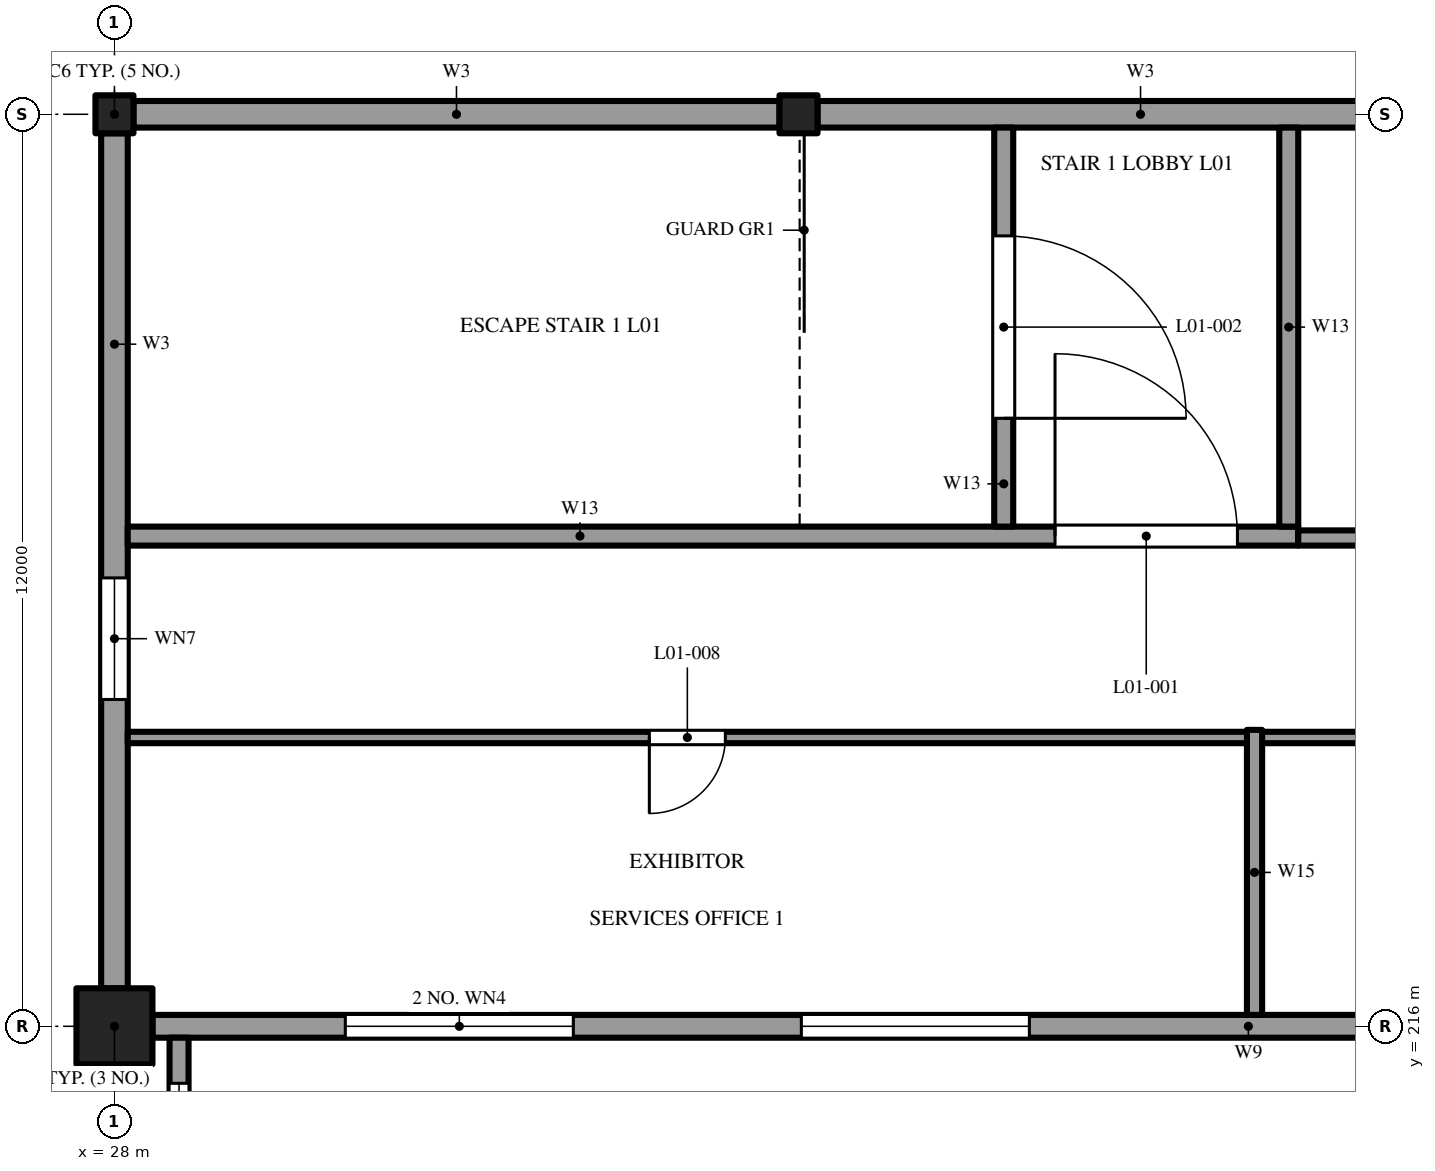
"""IFC4 building model, lengths in metres.
Left out: names, types, materials, properties, quantities, classifications, styles, units other than length and angle.
Written with IfcOpenShell. Run it as: python <this file> out.ifc"""

import sys

from ifc_helpers import new_model, si_unit, direction, frame, frame_2d, origin, origin_2d, place, context, subcontext, project, spatial, polyline, rectangle, outline, extrude, element, fill, save


model = new_model("IFC4")
c1 = context("Model", 3, precision=1e-05, world=origin(), true_north=direction((0.0, 1.0)))
c2 = subcontext(c1, "Body", "Model", "MODEL_VIEW")
j1 = project(units=[si_unit("LENGTHUNIT", "METRE"), si_unit("PLANEANGLEUNIT", "RADIAN")], contexts=[c1])
p1 = place(None, origin())
s1 = spatial("IfcSite", under=j1, at=p1, CompositionType="ELEMENT")
p2 = place(p1, origin())
s2 = spatial("IfcBuilding", under=s1, at=p2, CompositionType="ELEMENT")
p3 = place(p2, frame((0.0, 0.0, 7.2)))
s3 = spatial("IfcBuildingStorey", under=s2, at=p3, CompositionType="ELEMENT", Elevation=7.2)
p4 = place(p3, frame((28.0, 216.0, 0.0), z_axis=(0.0, 0.0, 1.0), x_axis=(1.0, 0.0, 0.0)))
e1 = element("IfcColumn", 1, at=p4, inside=s3, PredefinedType="COLUMN", context=c2, shape_type="SweptSolid", body=[
    extrude(rectangle(XDim=1.0, YDim=1.0, at=origin_2d()), origin(), (0.0, 0.0, 1.0), 4.8),
])
for number, where, z_axis, x_axis in (
    (2, (28.0, 228.0, 0.0), (0.0, 0.0, 1.0), (1.0, 0.0, 0.0)),
    (3, (37.0, 228.0, 0.0), (0.0, 0.0, 1.0), (1.0, 0.0, 0.0)),
):
    element("IfcColumn", number, at=place(p3, frame(where, z_axis=z_axis, x_axis=x_axis)), inside=s3, PredefinedType="COLUMN", context=c2, shape_type="SweptSolid", body=[
        extrude(rectangle(XDim=0.5, YDim=0.5, at=origin_2d()), origin(), (0.0, 0.0, 1.0), 4.121),
    ])
p5 = place(p3, frame((28.5, 216.0, 0.0), z_axis=(0.0, 0.0, 1.0), x_axis=(1.0, 0.0, 0.0)))
e4 = element("IfcWall", 4, at=p5, inside=s3, PredefinedType="SOLIDWALL", context=c2, shape_type="SweptSolid", body=[
    extrude(rectangle(XDim=17.0, YDim=0.3, at=frame_2d((8.5, 0.0))), origin(), (0.0, 0.0, 1.0), 4.8),
])
p6 = place(p5, frame((2.538, 0.0, 1.0)))
e5 = element("IfcOpeningElement", 5, at=p6, cuts=e4, PredefinedType="OPENING", context=c2, shape_type="SweptSolid", body=[
    extrude(rectangle(XDim=3.0, YDim=1.8, at=frame_2d((1.5, 0.9))), frame((0.0, 0.16, 0.0), z_axis=(0.0, -1.0, 0.0), x_axis=(1.0, 0.0, 0.0)), (0.0, 0.0, 1.0), 0.32),
])
p7 = place(p5, frame((8.538, 0.0, 1.0)))
e6 = element("IfcOpeningElement", 6, at=p7, cuts=e4, PredefinedType="OPENING", context=c2, shape_type="SweptSolid", body=[
    extrude(rectangle(XDim=3.0, YDim=1.8, at=frame_2d((1.5, 0.9))), frame((0.0, 0.16, 0.0), z_axis=(0.0, -1.0, 0.0), x_axis=(1.0, 0.0, 0.0)), (0.0, 0.0, 1.0), 0.32),
])
p8 = place(p3, frame((28.85, 132.15, 0.0), z_axis=(0.0, 0.0, 1.0), x_axis=(0.0, 1.0, 0.0)))
e7 = element("IfcWall", 7, at=p8, inside=s3, PredefinedType="SOLIDWALL", context=c2, shape_type="SweptSolid", body=[
    extrude(rectangle(XDim=83.7, YDim=0.25, at=frame_2d((41.85, 0.0))), origin(), (0.0, 0.0, 1.0), 4.8),
])
p9 = place(p8, frame((0.6, 0.0, 0.4)))
e8 = element("IfcOpeningElement", 8, at=p9, cuts=e7, PredefinedType="OPENING", context=c2, shape_type="SweptSolid", body=[
    extrude(rectangle(XDim=4.5, YDim=3.6, at=frame_2d((2.25, 1.8))), frame((0.0, 0.135, 0.0), z_axis=(0.0, -1.0, 0.0), x_axis=(1.0, 0.0, 0.0)), (0.0, 0.0, 1.0), 0.27),
])
p10 = place(p8, frame((6.6, 0.0, 0.4)))
e9 = element("IfcOpeningElement", 9, at=p10, cuts=e7, PredefinedType="OPENING", context=c2, shape_type="SweptSolid", body=[
    extrude(rectangle(XDim=4.5, YDim=3.6, at=frame_2d((2.25, 1.8))), frame((0.0, 0.135, 0.0), z_axis=(0.0, -1.0, 0.0), x_axis=(1.0, 0.0, 0.0)), (0.0, 0.0, 1.0), 0.27),
])
p11 = place(p8, frame((12.6, 0.0, 0.4)))
e10 = element("IfcOpeningElement", 10, at=p11, cuts=e7, PredefinedType="OPENING", context=c2, shape_type="SweptSolid", body=[
    extrude(rectangle(XDim=4.5, YDim=3.6, at=frame_2d((2.25, 1.8))), frame((0.0, 0.135, 0.0), z_axis=(0.0, -1.0, 0.0), x_axis=(1.0, 0.0, 0.0)), (0.0, 0.0, 1.0), 0.27),
])
p12 = place(p8, frame((18.6, 0.0, 0.4)))
e11 = element("IfcOpeningElement", 11, at=p12, cuts=e7, PredefinedType="OPENING", context=c2, shape_type="SweptSolid", body=[
    extrude(rectangle(XDim=4.5, YDim=3.6, at=frame_2d((2.25, 1.8))), frame((0.0, 0.135, 0.0), z_axis=(0.0, -1.0, 0.0), x_axis=(1.0, 0.0, 0.0)), (0.0, 0.0, 1.0), 0.27),
])
p13 = place(p8, frame((24.6, 0.0, 0.4)))
e12 = element("IfcOpeningElement", 12, at=p13, cuts=e7, PredefinedType="OPENING", context=c2, shape_type="SweptSolid", body=[
    extrude(rectangle(XDim=4.5, YDim=3.6, at=frame_2d((2.25, 1.8))), frame((0.0, 0.135, 0.0), z_axis=(0.0, -1.0, 0.0), x_axis=(1.0, 0.0, 0.0)), (0.0, 0.0, 1.0), 0.27),
])
p14 = place(p8, frame((30.6, 0.0, 0.4)))
e13 = element("IfcOpeningElement", 13, at=p14, cuts=e7, PredefinedType="OPENING", context=c2, shape_type="SweptSolid", body=[
    extrude(rectangle(XDim=4.5, YDim=3.6, at=frame_2d((2.25, 1.8))), frame((0.0, 0.135, 0.0), z_axis=(0.0, -1.0, 0.0), x_axis=(1.0, 0.0, 0.0)), (0.0, 0.0, 1.0), 0.27),
])
p15 = place(p8, frame((36.6, 0.0, 0.4)))
e14 = element("IfcOpeningElement", 14, at=p15, cuts=e7, PredefinedType="OPENING", context=c2, shape_type="SweptSolid", body=[
    extrude(rectangle(XDim=4.5, YDim=3.6, at=frame_2d((2.25, 1.8))), frame((0.0, 0.135, 0.0), z_axis=(0.0, -1.0, 0.0), x_axis=(1.0, 0.0, 0.0)), (0.0, 0.0, 1.0), 0.27),
])
p16 = place(p8, frame((42.6, 0.0, 0.4)))
e15 = element("IfcOpeningElement", 15, at=p16, cuts=e7, PredefinedType="OPENING", context=c2, shape_type="SweptSolid", body=[
    extrude(rectangle(XDim=4.5, YDim=3.6, at=frame_2d((2.25, 1.8))), frame((0.0, 0.135, 0.0), z_axis=(0.0, -1.0, 0.0), x_axis=(1.0, 0.0, 0.0)), (0.0, 0.0, 1.0), 0.27),
])
p17 = place(p8, frame((48.6, 0.0, 0.4)))
e16 = element("IfcOpeningElement", 16, at=p17, cuts=e7, PredefinedType="OPENING", context=c2, shape_type="SweptSolid", body=[
    extrude(rectangle(XDim=4.5, YDim=3.6, at=frame_2d((2.25, 1.8))), frame((0.0, 0.135, 0.0), z_axis=(0.0, -1.0, 0.0), x_axis=(1.0, 0.0, 0.0)), (0.0, 0.0, 1.0), 0.27),
])
p18 = place(p8, frame((54.6, 0.0, 0.4)))
e17 = element("IfcOpeningElement", 17, at=p18, cuts=e7, PredefinedType="OPENING", context=c2, shape_type="SweptSolid", body=[
    extrude(rectangle(XDim=4.5, YDim=3.6, at=frame_2d((2.25, 1.8))), frame((0.0, 0.135, 0.0), z_axis=(0.0, -1.0, 0.0), x_axis=(1.0, 0.0, 0.0)), (0.0, 0.0, 1.0), 0.27),
])
p19 = place(p8, frame((60.6, 0.0, 0.4)))
e18 = element("IfcOpeningElement", 18, at=p19, cuts=e7, PredefinedType="OPENING", context=c2, shape_type="SweptSolid", body=[
    extrude(rectangle(XDim=4.5, YDim=3.6, at=frame_2d((2.25, 1.8))), frame((0.0, 0.135, 0.0), z_axis=(0.0, -1.0, 0.0), x_axis=(1.0, 0.0, 0.0)), (0.0, 0.0, 1.0), 0.27),
])
p20 = place(p8, frame((66.6, 0.0, 0.4)))
e19 = element("IfcOpeningElement", 19, at=p20, cuts=e7, PredefinedType="OPENING", context=c2, shape_type="SweptSolid", body=[
    extrude(rectangle(XDim=4.5, YDim=3.6, at=frame_2d((2.25, 1.8))), frame((0.0, 0.135, 0.0), z_axis=(0.0, -1.0, 0.0), x_axis=(1.0, 0.0, 0.0)), (0.0, 0.0, 1.0), 0.27),
])
p21 = place(p8, frame((72.6, 0.0, 0.4)))
e20 = element("IfcOpeningElement", 20, at=p21, cuts=e7, PredefinedType="OPENING", context=c2, shape_type="SweptSolid", body=[
    extrude(rectangle(XDim=4.5, YDim=3.6, at=frame_2d((2.25, 1.8))), frame((0.0, 0.135, 0.0), z_axis=(0.0, -1.0, 0.0), x_axis=(1.0, 0.0, 0.0)), (0.0, 0.0, 1.0), 0.27),
])
p22 = place(p8, frame((78.6, 0.0, 0.4)))
e21 = element("IfcOpeningElement", 21, at=p22, cuts=e7, PredefinedType="OPENING", context=c2, shape_type="SweptSolid", body=[
    extrude(rectangle(XDim=4.5, YDim=3.6, at=frame_2d((2.25, 1.8))), frame((0.0, 0.135, 0.0), z_axis=(0.0, -1.0, 0.0), x_axis=(1.0, 0.0, 0.0)), (0.0, 0.0, 1.0), 0.27),
])
p23 = place(p3, frame((28.0, 216.5, 0.0), z_axis=(0.0, 0.0, 1.0), x_axis=(0.0, 1.0, 0.0)))
e22 = element("IfcWall", 22, at=p23, inside=s3, PredefinedType="SOLIDWALL", context=c2, shape_type="SweptSolid", body=[
    extrude(outline(polyline([(0.0, 0.0), (11.25, 0.0), (11.25, 4.125), (0.0, 4.715), (0.0, 0.0)])), frame((0.0, 0.175, 0.0), z_axis=(0.0, -1.0, 0.0), x_axis=(1.0, 0.0, 0.0)), (0.0, 0.0, 1.0), 0.35),
])
p24 = place(p23, frame((3.8, 0.0, 1.0)))
e23 = element("IfcOpeningElement", 23, at=p24, cuts=e22, PredefinedType="OPENING", context=c2, shape_type="SweptSolid", body=[
    extrude(rectangle(XDim=1.6, YDim=2.2, at=frame_2d((0.8, 1.1))), frame((0.0, 0.185, 0.0), z_axis=(0.0, -1.0, 0.0), x_axis=(1.0, 0.0, 0.0)), (0.0, 0.0, 1.0), 0.37),
])
for number, where, z_axis, x_axis in (
    (24, (28.25, 228.0, 0.0), (0.0, 0.0, 1.0), (1.0, 0.0, 0.0)),
    (25, (37.25, 228.0, 0.0), (0.0, 0.0, 1.0), (1.0, 0.0, 0.0)),
):
    element("IfcWall", number, at=place(p3, frame(where, z_axis=z_axis, x_axis=x_axis)), inside=s3, PredefinedType="SOLIDWALL", context=c2, shape_type="SweptSolid", body=[
        extrude(rectangle(XDim=8.5, YDim=0.35, at=frame_2d((4.25, 0.0))), origin(), (0.0, 0.0, 1.0), 4.112),
    ])
p25 = place(p3, frame((28.175, 222.45, 0.0), z_axis=(0.0, 0.0, 1.0), x_axis=(1.0, 0.0, 0.0)))
e26 = element("IfcWall", 26, at=p25, inside=s3, PredefinedType="SOLIDWALL", context=c2, shape_type="SweptSolid", body=[
    extrude(rectangle(XDim=15.4, YDim=0.25, at=frame_2d((7.7, 0.0))), origin(), (0.0, 0.0, 1.0), 4.406),
])
p26 = place(p25, frame((12.2, 0.0, 0.0)))
e27 = element("IfcOpeningElement", 27, at=p26, cuts=e26, PredefinedType="OPENING", context=c2, shape_type="SweptSolid", body=[
    extrude(rectangle(XDim=2.4, YDim=2.2, at=frame_2d((1.2, 1.1))), frame((0.0, 0.135, 0.0), z_axis=(0.0, -1.0, 0.0), x_axis=(1.0, 0.0, 0.0)), (0.0, 0.0, 1.0), 0.27),
])
p27 = place(p3, frame((39.7, 222.575, 0.0), z_axis=(0.0, 0.0, 1.0), x_axis=(0.0, 1.0, 0.0)))
e28 = element("IfcWall", 28, at=p27, inside=s3, PredefinedType="SOLIDWALL", context=c2, shape_type="SweptSolid", body=[
    extrude(outline(polyline([(0.0, 0.0), (5.25, 0.0), (5.25, 4.124), (0.0, 4.399), (0.0, 0.0)])), frame((0.0, 0.125, 0.0), z_axis=(0.0, -1.0, 0.0), x_axis=(1.0, 0.0, 0.0)), (0.0, 0.0, 1.0), 0.25),
])
p28 = place(p27, frame((1.425, 0.0, 0.0)))
e29 = element("IfcOpeningElement", 29, at=p28, cuts=e28, PredefinedType="OPENING", context=c2, shape_type="SweptSolid", body=[
    extrude(rectangle(XDim=2.4, YDim=2.2, at=frame_2d((1.2, 1.1))), frame((0.0, 0.135, 0.0), z_axis=(0.0, -1.0, 0.0), x_axis=(1.0, 0.0, 0.0)), (0.0, 0.0, 1.0), 0.27),
])
p29 = place(p3, frame((43.45, 222.575, 0.0), z_axis=(0.0, 0.0, 1.0), x_axis=(0.0, 1.0, 0.0)))
e30 = element("IfcWall", 30, at=p29, inside=s3, PredefinedType="SOLIDWALL", context=c2, shape_type="SweptSolid", body=[
    extrude(outline(polyline([(0.0, 0.0), (5.25, 0.0), (5.25, 4.124), (0.0, 4.399), (0.0, 0.0)])), frame((0.0, 0.125, 0.0), z_axis=(0.0, -1.0, 0.0), x_axis=(1.0, 0.0, 0.0)), (0.0, 0.0, 1.0), 0.25),
])
p30 = place(p3, frame((28.175, 219.8, 0.0), z_axis=(0.0, 0.0, 1.0), x_axis=(1.0, 0.0, 0.0)))
e31 = element("IfcWall", 31, at=p30, inside=s3, PredefinedType="PARTITIONING", context=c2, shape_type="SweptSolid", body=[
    extrude(rectangle(XDim=123.0, YDim=0.15, at=frame_2d((61.5, 0.0))), origin(), (0.0, 0.0, 1.0), 4.547),
])
p31 = place(p30, frame((6.863, 0.0, 0.0)))
e32 = element("IfcOpeningElement", 32, at=p31, cuts=e31, PredefinedType="OPENING", context=c2, shape_type="SweptSolid", body=[
    extrude(rectangle(XDim=1.0, YDim=2.1, at=frame_2d((0.5, 1.05))), frame((0.0, 0.085, 0.0), z_axis=(0.0, -1.0, 0.0), x_axis=(1.0, 0.0, 0.0)), (0.0, 0.0, 1.0), 0.17),
])
p32 = place(p30, frame((21.825, 0.0, 0.0)))
e33 = element("IfcOpeningElement", 33, at=p32, cuts=e31, PredefinedType="OPENING", context=c2, shape_type="SweptSolid", body=[
    extrude(rectangle(XDim=1.0, YDim=2.1, at=frame_2d((0.5, 1.05))), frame((0.0, 0.085, 0.0), z_axis=(0.0, -1.0, 0.0), x_axis=(1.0, 0.0, 0.0)), (0.0, 0.0, 1.0), 0.17),
])
p33 = place(p30, frame((36.825, 0.0, 0.0)))
e34 = element("IfcOpeningElement", 34, at=p33, cuts=e31, PredefinedType="OPENING", context=c2, shape_type="SweptSolid", body=[
    extrude(rectangle(XDim=1.0, YDim=2.1, at=frame_2d((0.5, 1.05))), frame((0.0, 0.085, 0.0), z_axis=(0.0, -1.0, 0.0), x_axis=(1.0, 0.0, 0.0)), (0.0, 0.0, 1.0), 0.17),
])
p34 = place(p30, frame((51.825, 0.0, 0.0)))
e35 = element("IfcOpeningElement", 35, at=p34, cuts=e31, PredefinedType="OPENING", context=c2, shape_type="SweptSolid", body=[
    extrude(rectangle(XDim=1.0, YDim=2.1, at=frame_2d((0.5, 1.05))), frame((0.0, 0.085, 0.0), z_axis=(0.0, -1.0, 0.0), x_axis=(1.0, 0.0, 0.0)), (0.0, 0.0, 1.0), 0.17),
])
p35 = place(p30, frame((62.725, 0.0, 0.0)))
e36 = element("IfcOpeningElement", 36, at=p35, cuts=e31, PredefinedType="OPENING", context=c2, shape_type="SweptSolid", body=[
    extrude(rectangle(XDim=1.2, YDim=2.1, at=frame_2d((0.6, 1.05))), frame((0.0, 0.085, 0.0), z_axis=(0.0, -1.0, 0.0), x_axis=(1.0, 0.0, 0.0)), (0.0, 0.0, 1.0), 0.17),
])
p36 = place(p30, frame((79.325, 0.0, 0.0)))
e37 = element("IfcOpeningElement", 37, at=p36, cuts=e31, PredefinedType="OPENING", context=c2, shape_type="SweptSolid", body=[
    extrude(rectangle(XDim=1.0, YDim=2.1, at=frame_2d((0.5, 1.05))), frame((0.0, 0.085, 0.0), z_axis=(0.0, -1.0, 0.0), x_axis=(1.0, 0.0, 0.0)), (0.0, 0.0, 1.0), 0.17),
])
p37 = place(p30, frame((96.825, 0.0, 0.0)))
e38 = element("IfcOpeningElement", 38, at=p37, cuts=e31, PredefinedType="OPENING", context=c2, shape_type="SweptSolid", body=[
    extrude(rectangle(XDim=1.0, YDim=2.1, at=frame_2d((0.5, 1.05))), frame((0.0, 0.085, 0.0), z_axis=(0.0, -1.0, 0.0), x_axis=(1.0, 0.0, 0.0)), (0.0, 0.0, 1.0), 0.17),
])
p38 = place(p30, frame((105.825, 0.0, 0.0)))
e39 = element("IfcOpeningElement", 39, at=p38, cuts=e31, PredefinedType="OPENING", context=c2, shape_type="SweptSolid", body=[
    extrude(rectangle(XDim=1.0, YDim=2.1, at=frame_2d((0.5, 1.05))), frame((0.0, 0.085, 0.0), z_axis=(0.0, -1.0, 0.0), x_axis=(1.0, 0.0, 0.0)), (0.0, 0.0, 1.0), 0.17),
])
p39 = place(p30, frame((112.575, 0.0, 0.0)))
e40 = element("IfcOpeningElement", 40, at=p39, cuts=e31, PredefinedType="OPENING", context=c2, shape_type="SweptSolid", body=[
    extrude(rectangle(XDim=1.0, YDim=2.1, at=frame_2d((0.5, 1.05))), frame((0.0, 0.085, 0.0), z_axis=(0.0, -1.0, 0.0), x_axis=(1.0, 0.0, 0.0)), (0.0, 0.0, 1.0), 0.17),
])
p40 = place(p30, frame((119.725, 0.0, 0.0)))
e41 = element("IfcOpeningElement", 41, at=p40, cuts=e31, PredefinedType="OPENING", context=c2, shape_type="SweptSolid", body=[
    extrude(rectangle(XDim=1.2, YDim=2.1, at=frame_2d((0.6, 1.05))), frame((0.0, 0.085, 0.0), z_axis=(0.0, -1.0, 0.0), x_axis=(1.0, 0.0, 0.0)), (0.0, 0.0, 1.0), 0.17),
])
p41 = place(p3, frame((43.0, 216.15, 0.0), z_axis=(0.0, 0.0, 1.0), x_axis=(0.0, 1.0, 0.0)))
e42 = element("IfcWall", 42, at=p41, inside=s3, PredefinedType="PARTITIONING", context=c2, shape_type="SweptSolid", body=[
    extrude(outline(polyline([(0.0, 0.0), (3.75, 0.0), (3.75, 4.541), (0.0, 4.737), (0.0, 0.0)])), frame((0.0, 0.1, 0.0), z_axis=(0.0, -1.0, 0.0), x_axis=(1.0, 0.0, 0.0)), (0.0, 0.0, 1.0), 0.2),
])
p42 = place(p3, frame((43.575, 222.425, 0.0), z_axis=(0.0, 0.0, 1.0), x_axis=(1.0, 0.0, 0.0)))
e43 = element("IfcWall", 43, at=p42, inside=s3, PredefinedType="PARTITIONING", context=c2, shape_type="SweptSolid", body=[
    extrude(rectangle(XDim=38.775, YDim=0.2, at=frame_2d((19.388, 0.0))), origin(), (0.0, 0.0, 1.0), 4.408),
])
p43 = place(p42, frame((17.825, 0.0, 0.0)))
e44 = element("IfcOpeningElement", 44, at=p43, cuts=e43, PredefinedType="OPENING", context=c2, shape_type="SweptSolid", body=[
    extrude(rectangle(XDim=1.2, YDim=2.1, at=frame_2d((0.6, 1.05))), frame((0.0, 0.11, 0.0), z_axis=(0.0, -1.0, 0.0), x_axis=(1.0, 0.0, 0.0)), (0.0, 0.0, 1.0), 0.22),
])
p44 = place(p6, origin())
e45 = element("IfcWindow", 45, at=p44, inside=s3, PartitioningType="SINGLE_PANEL", PredefinedType="WINDOW", context=c2, shape_type="SweptSolid", body=[
    extrude(rectangle(XDim=3.0, YDim=1.8, at=frame_2d((1.5, 0.9))), frame((0.0, 0.03, 0.0), z_axis=(0.0, -1.0, 0.0), x_axis=(1.0, 0.0, 0.0)), (0.0, 0.0, 1.0), 0.06),
])
fill(e5, e45)
p45 = place(p7, origin())
e46 = element("IfcWindow", 46, at=p45, inside=s3, PartitioningType="SINGLE_PANEL", PredefinedType="WINDOW", context=c2, shape_type="SweptSolid", body=[
    extrude(rectangle(XDim=3.0, YDim=1.8, at=frame_2d((1.5, 0.9))), frame((0.0, 0.03, 0.0), z_axis=(0.0, -1.0, 0.0), x_axis=(1.0, 0.0, 0.0)), (0.0, 0.0, 1.0), 0.06),
])
fill(e6, e46)
p46 = place(p22, origin())
e47 = element("IfcWindow", 47, at=p46, inside=s3, PartitioningType="SINGLE_PANEL", PredefinedType="WINDOW", context=c2, shape_type="SweptSolid", body=[
    extrude(rectangle(XDim=4.5, YDim=3.6, at=frame_2d((2.25, 1.8))), frame((0.0, 0.03, 0.0), z_axis=(0.0, -1.0, 0.0), x_axis=(1.0, 0.0, 0.0)), (0.0, 0.0, 1.0), 0.06),
])
fill(e21, e47)
p47 = place(p24, origin())
e48 = element("IfcWindow", 48, at=p47, inside=s3, PartitioningType="SINGLE_PANEL", PredefinedType="WINDOW", context=c2, shape_type="SweptSolid", body=[
    extrude(rectangle(XDim=1.6, YDim=2.2, at=frame_2d((0.8, 1.1))), frame((0.0, 0.03, 0.0), z_axis=(0.0, -1.0, 0.0), x_axis=(1.0, 0.0, 0.0)), (0.0, 0.0, 1.0), 0.06),
])
fill(e23, e48)
p48 = place(p26, origin())
e49 = element("IfcDoor", 49, at=p48, inside=s3, OperationType="DOUBLE_DOOR_SINGLE_SWING", PredefinedType="DOOR", context=c2, shape_type="SweptSolid", body=[
    extrude(rectangle(XDim=2.4, YDim=2.2, at=frame_2d((1.2, 1.1))), frame((0.0, 0.025, 0.0), z_axis=(0.0, -1.0, 0.0), x_axis=(1.0, 0.0, 0.0)), (0.0, 0.0, 1.0), 0.05),
])
fill(e27, e49)
p49 = place(p28, frame((2.4, 0.0, 0.0), z_axis=(0.0, 0.0, 1.0), x_axis=(-1.0, 0.0, 0.0)))
e50 = element("IfcDoor", 50, at=p49, inside=s3, OperationType="DOUBLE_DOOR_SINGLE_SWING", PredefinedType="DOOR", context=c2, shape_type="SweptSolid", body=[
    extrude(rectangle(XDim=2.4, YDim=2.2, at=frame_2d((1.2, 1.1))), frame((0.0, 0.025, 0.0), z_axis=(0.0, -1.0, 0.0), x_axis=(1.0, 0.0, 0.0)), (0.0, 0.0, 1.0), 0.05),
])
fill(e29, e50)
p50 = place(p31, frame((1.0, 0.0, 0.0), z_axis=(0.0, 0.0, 1.0), x_axis=(-1.0, 0.0, 0.0)))
e51 = element("IfcDoor", 51, at=p50, inside=s3, OperationType="SINGLE_SWING_LEFT", PredefinedType="DOOR", context=c2, shape_type="SweptSolid", body=[
    extrude(rectangle(XDim=1.0, YDim=2.1, at=frame_2d((0.5, 1.05))), frame((0.0, 0.025, 0.0), z_axis=(0.0, -1.0, 0.0), x_axis=(1.0, 0.0, 0.0)), (0.0, 0.0, 1.0), 0.05),
])
fill(e32, e51)
save(model, sys.argv[1])
